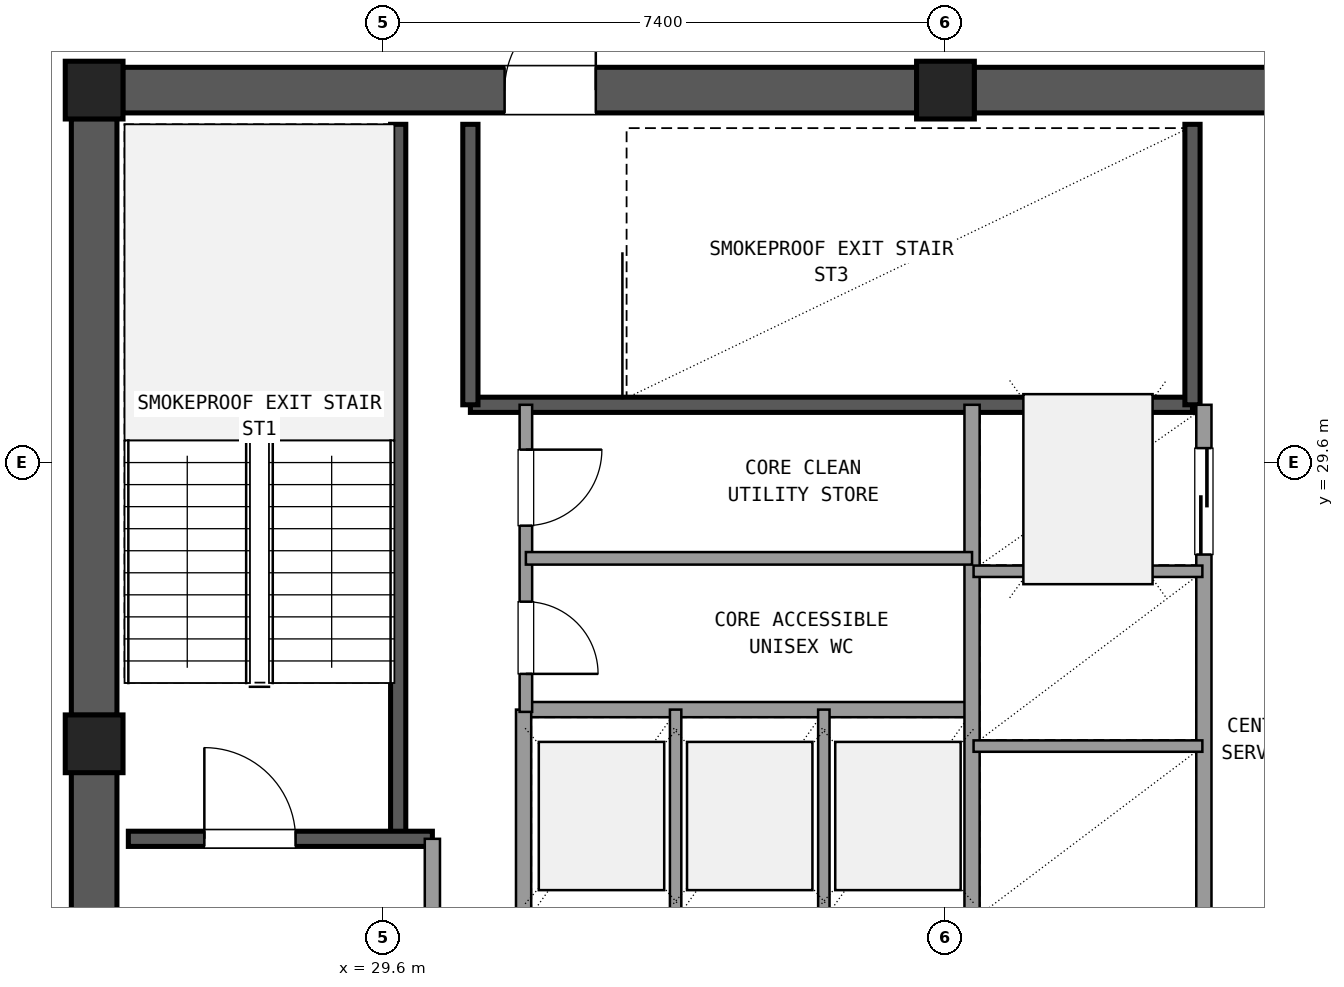
"""IFC4 building model, lengths in metres.
Left out: names, types, materials, properties, quantities, classifications, styles, units other than length and angle.
Written with IfcOpenShell. Run it as: python <this file> out.ifc"""

import sys

from ifc_helpers import new_model, si_unit, direction, frame, frame_2d, origin, origin_2d, place, context, subcontext, project, spatial, rectangle, extrude, element, fill, save


model = new_model("IFC4")
c1 = context("Model", 3, precision=1e-05, world=origin(), true_north=direction((0.0, 1.0)))
c2 = subcontext(c1, "Body", "Model", "MODEL_VIEW")
j1 = project(units=[si_unit("LENGTHUNIT", "METRE"), si_unit("PLANEANGLEUNIT", "RADIAN")], contexts=[c1])
p1 = place(None, origin())
s1 = spatial("IfcSite", under=j1, at=p1, CompositionType="ELEMENT")
p2 = place(p1, origin())
s2 = spatial("IfcBuilding", under=s1, at=p2, CompositionType="ELEMENT")
p3 = place(p2, frame((0.0, 0.0, 294.66)))
s3 = spatial("IfcBuildingStorey", under=s2, at=p3, CompositionType="ELEMENT", Elevation=294.66)
for number, where, z_axis, x_axis in (
    (1, (37.0, 34.5, 0.0), (0.0, 0.0, 1.0), (1.0, 0.0, 0.0)),
    (2, (25.8, 34.5, 0.0), (0.0, 0.0, 1.0), (1.0, 0.0, 0.0)),
    (3, (25.8, 25.9, 0.0), (0.0, 0.0, 1.0), (1.0, 0.0, 0.0)),
):
    element("IfcColumn", number, at=place(p3, frame(where, z_axis=z_axis, x_axis=x_axis)), inside=s3, PredefinedType="COLUMN", context=c2, shape_type="SweptSolid", body=[
        extrude(rectangle(XDim=0.76, YDim=0.76, at=origin_2d()), origin(), (0.0, 0.0, 1.0), 4.32),
    ])
p4 = place(p3, frame((47.825, 34.5, 0.0), z_axis=(0.0, 0.0, 1.0), x_axis=(-1.0, 0.0, 0.0)))
e4 = element("IfcWall", 4, at=p4, inside=s3, PredefinedType="SHEAR", context=c2, shape_type="SweptSolid", body=[
    extrude(rectangle(XDim=10.45, YDim=0.6, at=frame_2d((5.225, 0.0))), origin(), (0.0, 0.0, 1.0), 4.02),
])
p5 = place(p4, frame((4.725, 0.0, 0.0)))
e5 = element("IfcOpeningElement", 5, at=p5, cuts=e4, PredefinedType="OPENING", context=c2, shape_type="SweptSolid", body=[
    extrude(rectangle(XDim=1.6, YDim=2.2, at=frame_2d((0.8, 1.1))), frame((0.0, 0.31, 0.0), z_axis=(0.0, -1.0, 0.0), x_axis=(1.0, 0.0, 0.0)), (0.0, 0.0, 1.0), 0.62),
])
p6 = place(p3, frame((36.625, 34.5, 0.0), z_axis=(0.0, 0.0, 1.0), x_axis=(-1.0, 0.0, 0.0)))
e6 = element("IfcWall", 6, at=p6, inside=s3, PredefinedType="SHEAR", context=c2, shape_type="SweptSolid", body=[
    extrude(rectangle(XDim=10.45, YDim=0.6, at=frame_2d((5.225, 0.0))), origin(), (0.0, 0.0, 1.0), 4.02),
])
p7 = place(p6, frame((4.225, 0.0, 0.0)))
e7 = element("IfcOpeningElement", 7, at=p7, cuts=e6, PredefinedType="OPENING", context=c2, shape_type="SweptSolid", body=[
    extrude(rectangle(XDim=1.2, YDim=2.15, at=frame_2d((0.6, 1.075))), frame((0.0, 0.31, 0.0), z_axis=(0.0, -1.0, 0.0), x_axis=(1.0, 0.0, 0.0)), (0.0, 0.0, 1.0), 0.62),
])
p8 = place(p3, frame((25.8, 34.125, 0.0), z_axis=(0.0, 0.0, 1.0), x_axis=(0.0, -1.0, 0.0)))
e8 = element("IfcWall", 8, at=p8, inside=s3, PredefinedType="SHEAR", context=c2, shape_type="SweptSolid", body=[
    extrude(rectangle(XDim=7.85, YDim=0.6, at=frame_2d((3.925, 0.0))), origin(), (0.0, 0.0, 1.0), 4.02),
])
p9 = place(p3, frame((25.8, 25.525, 0.0), z_axis=(0.0, 0.0, 1.0), x_axis=(0.0, -1.0, 0.0)))
e9 = element("IfcWall", 9, at=p9, inside=s3, PredefinedType="SHEAR", context=c2, shape_type="SweptSolid", body=[
    extrude(rectangle(XDim=7.85, YDim=0.6, at=frame_2d((3.925, 0.0))), origin(), (0.0, 0.0, 1.0), 4.02),
])
p10 = place(p9, frame((2.275, 0.0, 0.0)))
e10 = element("IfcOpeningElement", 10, at=p10, cuts=e9, PredefinedType="OPENING", context=c2, shape_type="SweptSolid", body=[
    extrude(rectangle(XDim=1.2, YDim=2.15, at=frame_2d((0.6, 1.075))), frame((0.0, 0.31, 0.0), z_axis=(0.0, -1.0, 0.0), x_axis=(1.0, 0.0, 0.0)), (0.0, 0.0, 1.0), 0.62),
])
p11 = place(p3, frame((29.8, 24.65, 0.0), z_axis=(0.0, 0.0, 1.0), x_axis=(0.0, 1.0, 0.0)))
e11 = element("IfcWall", 11, at=p11, inside=s3, PredefinedType="SHEAR", context=c2, shape_type="SweptSolid", body=[
    extrude(rectangle(XDim=9.4, YDim=0.2, at=frame_2d((4.7, 0.0))), origin(), (0.0, 0.0, 1.0), 4.02),
])
p12 = place(p3, frame((26.25, 24.65, 0.0), z_axis=(0.0, 0.0, 1.0), x_axis=(1.0, 0.0, 0.0)))
e12 = element("IfcWall", 12, at=p12, inside=s3, PredefinedType="SHEAR", context=c2, shape_type="SweptSolid", body=[
    extrude(rectangle(XDim=4.0, YDim=0.2, at=frame_2d((2.0, 0.0))), origin(), (0.0, 0.0, 1.0), 4.02),
])
p13 = place(p12, frame((1.0, 0.0, 0.0)))
e13 = element("IfcOpeningElement", 13, at=p13, cuts=e12, PredefinedType="OPENING", context=c2, shape_type="SweptSolid", body=[
    extrude(rectangle(XDim=1.2, YDim=2.15, at=frame_2d((0.6, 1.075))), frame((0.0, 0.11, 0.0), z_axis=(0.0, -1.0, 0.0), x_axis=(1.0, 0.0, 0.0)), (0.0, 0.0, 1.0), 0.22),
])
p14 = place(p3, frame((30.75, 30.36, 0.0), z_axis=(0.0, 0.0, 1.0), x_axis=(1.0, 0.0, 0.0)))
e14 = element("IfcWall", 14, at=p14, inside=s3, PredefinedType="SHEAR", context=c2, shape_type="SweptSolid", body=[
    extrude(rectangle(XDim=9.5, YDim=0.2, at=frame_2d((4.75, 0.0))), origin(), (0.0, 0.0, 1.0), 4.02),
])
for number, where, z_axis, x_axis in (
    (15, (30.75, 30.36, 0.0), (0.0, 0.0, 1.0), (0.0, 1.0, 0.0)),
    (16, (40.25, 30.36, 0.0), (0.0, 0.0, 1.0), (0.0, 1.0, 0.0)),
):
    element("IfcWall", number, at=place(p3, frame(where, z_axis=z_axis, x_axis=x_axis)), inside=s3, PredefinedType="SHEAR", context=c2, shape_type="SweptSolid", body=[
        extrude(rectangle(XDim=3.69, YDim=0.2, at=frame_2d((1.845, 0.0))), origin(), (0.0, 0.0, 1.0), 4.02),
    ])
p15 = place(p3, frame((30.25, 17.75, 0.0), z_axis=(0.0, 0.0, 1.0), x_axis=(0.0, 1.0, 0.0)))
e17 = element("IfcWall", 17, at=p15, inside=s3, PredefinedType="SOLIDWALL", context=c2, shape_type="SweptSolid", body=[
    extrude(rectangle(XDim=6.9, YDim=0.2, at=frame_2d((3.45, 0.0))), origin(), (0.0, 0.0, 1.0), 3.31),
])
p16 = place(p15, frame((4.15, 0.0, 0.0)))
e18 = element("IfcOpeningElement", 18, at=p16, cuts=e17, PredefinedType="OPENING", context=c2, shape_type="SweptSolid", body=[
    extrude(rectangle(XDim=1.2, YDim=2.15, at=frame_2d((0.6, 1.075))), frame((0.0, 0.11, 0.0), z_axis=(0.0, -1.0, 0.0), x_axis=(1.0, 0.0, 0.0)), (0.0, 0.0, 1.0), 0.22),
])
p17 = place(p3, frame((31.45, 26.35, 0.0), z_axis=(0.0, 0.0, 1.0), x_axis=(1.0, 0.0, 0.0)))
e19 = element("IfcWall", 19, at=p17, inside=s3, PredefinedType="SOLIDWALL", context=c2, shape_type="SweptSolid", body=[
    extrude(rectangle(XDim=5.9, YDim=0.2, at=frame_2d((2.95, 0.0))), origin(), (0.0, 0.0, 1.0), 3.31),
])
p18 = place(p3, frame((31.45, 23.54, 0.0), z_axis=(0.0, 0.0, 1.0), x_axis=(0.0, 1.0, 0.0)))
e20 = element("IfcWall", 20, at=p18, inside=s3, PredefinedType="SOLIDWALL", context=c2, shape_type="SweptSolid", body=[
    extrude(rectangle(XDim=2.81, YDim=0.2, at=frame_2d((1.405, 0.0))), origin(), (0.0, 0.0, 1.0), 3.31),
])
for number, where, z_axis, x_axis in (
    (21, (33.45, 23.54, 0.0), (0.0, 0.0, 1.0), (0.0, 1.0, 0.0)),
    (22, (35.4, 23.54, 0.0), (0.0, 0.0, 1.0), (0.0, 1.0, 0.0)),
):
    element("IfcWall", number, at=place(p3, frame(where, z_axis=z_axis, x_axis=x_axis)), inside=s3, PredefinedType="PARTITIONING", context=c2, shape_type="SweptSolid", body=[
        extrude(rectangle(XDim=2.81, YDim=0.15, at=frame_2d((1.405, 0.0))), origin(), (0.0, 0.0, 1.0), 3.31),
    ])
p19 = place(p3, frame((37.35, 23.54, 0.0), z_axis=(0.0, 0.0, 1.0), x_axis=(0.0, 1.0, 0.0)))
e23 = element("IfcWall", 23, at=p19, inside=s3, PredefinedType="SOLIDWALL", context=c2, shape_type="SweptSolid", body=[
    extrude(rectangle(XDim=6.82, YDim=0.2, at=frame_2d((3.41, 0.0))), origin(), (0.0, 0.0, 1.0), 3.31),
])
p20 = place(p3, frame((40.4, 23.54, 0.0), z_axis=(0.0, 0.0, 1.0), x_axis=(0.0, 1.0, 0.0)))
e24 = element("IfcWall", 24, at=p20, inside=s3, PredefinedType="SOLIDWALL", context=c2, shape_type="SweptSolid", body=[
    extrude(rectangle(XDim=6.82, YDim=0.2, at=frame_2d((3.41, 0.0))), origin(), (0.0, 0.0, 1.0), 3.31),
])
p21 = place(p20, frame((4.85, 0.0, 0.0)))
e25 = element("IfcOpeningElement", 25, at=p21, cuts=e24, PredefinedType="OPENING", context=c2, shape_type="SweptSolid", body=[
    extrude(rectangle(XDim=1.4, YDim=2.2, at=frame_2d((0.7, 1.1))), frame((0.0, 0.11, 0.0), z_axis=(0.0, -1.0, 0.0), x_axis=(1.0, 0.0, 0.0)), (0.0, 0.0, 1.0), 0.22),
])
for number, where, z_axis, x_axis in (
    (26, (37.37, 25.87, 0.0), (0.0, 0.0, 1.0), (1.0, 0.0, 0.0)),
    (27, (37.37, 28.17, 0.0), (0.0, 0.0, 1.0), (1.0, 0.0, 0.0)),
):
    element("IfcWall", number, at=place(p3, frame(where, z_axis=z_axis, x_axis=x_axis)), inside=s3, PredefinedType="PARTITIONING", context=c2, shape_type="SweptSolid", body=[
        extrude(rectangle(XDim=3.01, YDim=0.15, at=frame_2d((1.505, 0.0))), origin(), (0.0, 0.0, 1.0), 3.31),
    ])
p22 = place(p3, frame((31.48, 26.32, 0.0), z_axis=(0.0, 0.0, 1.0), x_axis=(0.0, 1.0, 0.0)))
e28 = element("IfcWall", 28, at=p22, inside=s3, PredefinedType="PLUMBINGWALL", context=c2, shape_type="SweptSolid", body=[
    extrude(rectangle(XDim=4.04, YDim=0.165, at=frame_2d((2.02, 0.0))), origin(), (0.0, 0.0, 1.0), 3.31),
])
p23 = place(p22, frame((0.5, 0.0, 0.0)))
e29 = element("IfcOpeningElement", 29, at=p23, cuts=e28, PredefinedType="OPENING", context=c2, shape_type="SweptSolid", body=[
    extrude(rectangle(XDim=0.95, YDim=2.1, at=frame_2d((0.475, 1.05))), frame((0.0, 0.093, 0.0), z_axis=(0.0, -1.0, 0.0), x_axis=(1.0, 0.0, 0.0)), (0.0, 0.0, 1.0), 0.185),
])
p24 = place(p22, frame((2.45, 0.0, 0.0)))
e30 = element("IfcOpeningElement", 30, at=p24, cuts=e28, PredefinedType="OPENING", context=c2, shape_type="SweptSolid", body=[
    extrude(rectangle(XDim=1.0, YDim=2.15, at=frame_2d((0.5, 1.075))), frame((0.0, 0.093, 0.0), z_axis=(0.0, -1.0, 0.0), x_axis=(1.0, 0.0, 0.0)), (0.0, 0.0, 1.0), 0.185),
])
p25 = place(p3, frame((31.48, 28.34, 0.0), z_axis=(0.0, 0.0, 1.0), x_axis=(1.0, 0.0, 0.0)))
e31 = element("IfcWall", 31, at=p25, inside=s3, PredefinedType="PLUMBINGWALL", context=c2, shape_type="SweptSolid", body=[
    extrude(rectangle(XDim=5.87, YDim=0.165, at=frame_2d((2.935, 0.0))), origin(), (0.0, 0.0, 1.0), 3.31),
])
p26 = place(p13, origin())
e32 = element("IfcDoor", 32, at=p26, inside=s3, OperationType="SINGLE_SWING_LEFT", PredefinedType="DOOR", context=c2, shape_type="SweptSolid", body=[
    extrude(rectangle(XDim=1.2, YDim=2.15, at=frame_2d((0.6, 1.075))), frame((0.0, 0.025, 0.0), z_axis=(0.0, -1.0, 0.0), x_axis=(1.0, 0.0, 0.0)), (0.0, 0.0, 1.0), 0.05),
])
fill(e13, e32)
p27 = place(p7, frame((1.2, 0.0, 0.0), z_axis=(0.0, 0.0, 1.0), x_axis=(-1.0, 0.0, 0.0)))
e33 = element("IfcDoor", 33, at=p27, inside=s3, OperationType="SINGLE_SWING_LEFT", PredefinedType="DOOR", context=c2, shape_type="SweptSolid", body=[
    extrude(rectangle(XDim=1.2, YDim=2.15, at=frame_2d((0.6, 1.075))), frame((0.0, 0.025, 0.0), z_axis=(0.0, -1.0, 0.0), x_axis=(1.0, 0.0, 0.0)), (0.0, 0.0, 1.0), 0.05),
])
fill(e7, e33)
p28 = place(p21, origin())
e34 = element("IfcDoor", 34, at=p28, inside=s3, OperationType="SLIDING_TO_RIGHT", PredefinedType="DOOR", context=c2, shape_type="SweptSolid", body=[
    extrude(rectangle(XDim=1.4, YDim=2.2, at=frame_2d((0.7, 1.1))), frame((0.0, 0.025, 0.0), z_axis=(0.0, -1.0, 0.0), x_axis=(1.0, 0.0, 0.0)), (0.0, 0.0, 1.0), 0.05),
])
fill(e25, e34)
p29 = place(p23, frame((0.95, 0.0, 0.0), z_axis=(0.0, 0.0, 1.0), x_axis=(-1.0, 0.0, 0.0)))
e35 = element("IfcDoor", 35, at=p29, inside=s3, OperationType="SINGLE_SWING_LEFT", PredefinedType="DOOR", context=c2, shape_type="SweptSolid", body=[
    extrude(rectangle(XDim=0.95, YDim=2.1, at=frame_2d((0.475, 1.05))), frame((0.0, 0.025, 0.0), z_axis=(0.0, -1.0, 0.0), x_axis=(1.0, 0.0, 0.0)), (0.0, 0.0, 1.0), 0.05),
])
fill(e29, e35)
p30 = place(p24, frame((1.0, 0.0, 0.0), z_axis=(0.0, 0.0, 1.0), x_axis=(-1.0, 0.0, 0.0)))
e36 = element("IfcDoor", 36, at=p30, inside=s3, OperationType="SINGLE_SWING_RIGHT", PredefinedType="DOOR", context=c2, shape_type="SweptSolid", body=[
    extrude(rectangle(XDim=1.0, YDim=2.15, at=frame_2d((0.5, 1.075))), frame((0.0, 0.025, 0.0), z_axis=(0.0, -1.0, 0.0), x_axis=(1.0, 0.0, 0.0)), (0.0, 0.0, 1.0), 0.05),
])
fill(e30, e36)
save(model, sys.argv[1])
